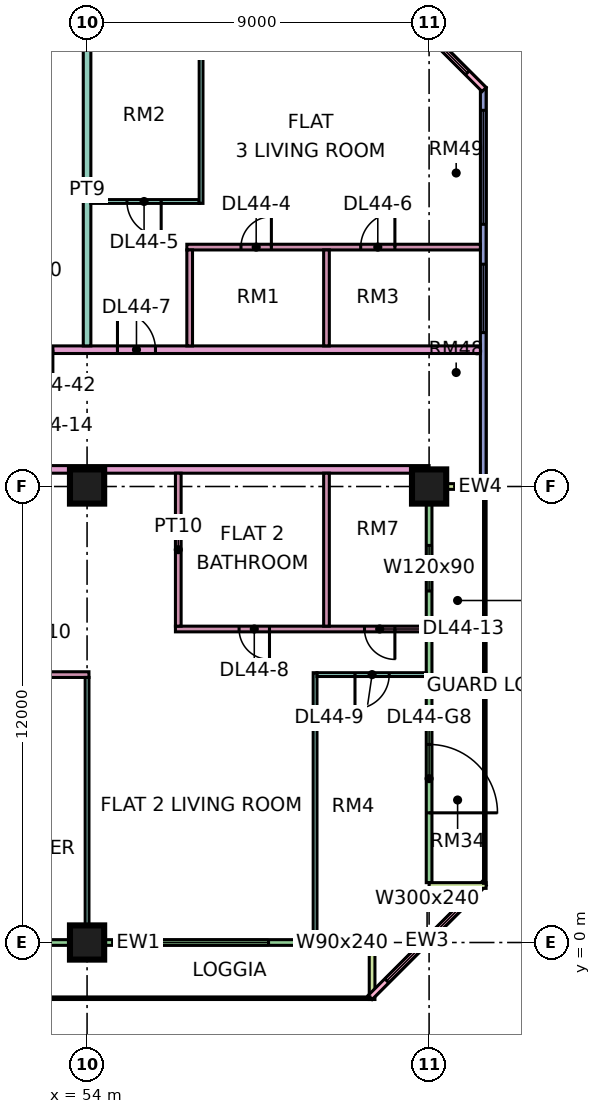
"""IFC4 building model, lengths in metres.
Left out: names, types, materials, properties, quantities, classifications, styles, units other than length and angle.
Written with IfcOpenShell. Run it as: python <this file> out.ifc"""

import sys

from ifc_helpers import new_model, si_unit, direction, frame, frame_2d, origin, origin_2d, place, context, subcontext, project, spatial, rectangle, extrude, element, fill, save


model = new_model("IFC4")
c1 = context("Model", 3, precision=1e-05, world=origin(), true_north=direction((0.0, 1.0)))
c2 = subcontext(c1, "Body", "Model", "MODEL_VIEW")
j1 = project(units=[si_unit("LENGTHUNIT", "METRE"), si_unit("PLANEANGLEUNIT", "RADIAN")], contexts=[c1])
p1 = place(None, origin())
s1 = spatial("IfcSite", under=j1, at=p1, CompositionType="ELEMENT")
p2 = place(p1, origin())
s2 = spatial("IfcBuilding", under=s1, at=p2, CompositionType="ELEMENT")
p3 = place(p2, frame((0.0, 0.0, 191.15)))
s3 = spatial("IfcBuildingStorey", under=s2, at=p3, CompositionType="ELEMENT", Elevation=191.15)
for number, where, z_axis, x_axis in (
    (1, (54.0, 0.0, 0.0), (0.0, 0.0, 1.0), (1.0, 0.0, 0.0)),
    (2, (54.0, 12.0, 0.0), (0.0, 0.0, 1.0), (1.0, 0.0, 0.0)),
    (3, (63.0, 12.0, 0.0), (0.0, 0.0, 1.0), (1.0, 0.0, 0.0)),
):
    element("IfcColumn", number, at=place(p3, frame(where, z_axis=z_axis, x_axis=x_axis)), inside=s3, PredefinedType="COLUMN", context=c2, shape_type="SweptSolid", body=[
        extrude(rectangle(XDim=0.9, YDim=0.9, at=origin_2d()), origin(), (0.0, 0.0, 1.0), 3.75),
    ])
p4 = place(p3, frame((48.075, 0.0, 0.0), z_axis=(0.0, 0.0, 1.0), x_axis=(1.0, 0.0, 0.0)))
e4 = element("IfcWall", 4, at=p4, inside=s3, PredefinedType="SOLIDWALL", context=c2, shape_type="SweptSolid", body=[
    extrude(rectangle(XDim=13.35, YDim=0.15, at=frame_2d((6.675, 0.0))), origin(), (0.0, 0.0, 1.0), 3.35),
])
p5 = place(p4, frame((1.788, 0.0, 0.0)))
e5 = element("IfcOpeningElement", 5, at=p5, cuts=e4, PredefinedType="OPENING", context=c2, shape_type="SweptSolid", body=[
    extrude(rectangle(XDim=1.8, YDim=2.4, at=frame_2d((0.9, 1.2))), frame((0.0, 0.085, 0.0), z_axis=(0.0, -1.0, 0.0), x_axis=(1.0, 0.0, 0.0)), (0.0, 0.0, 1.0), 0.17),
])
p6 = place(p4, frame((7.7, 0.0, 0.45)))
e6 = element("IfcOpeningElement", 6, at=p6, cuts=e4, PredefinedType="OPENING", context=c2, shape_type="SweptSolid", body=[
    extrude(rectangle(XDim=3.0, YDim=2.4, at=frame_2d((1.5, 1.2))), frame((0.0, 0.085, 0.0), z_axis=(0.0, -1.0, 0.0), x_axis=(1.0, 0.0, 0.0)), (0.0, 0.0, 1.0), 0.17),
])
p7 = place(p4, frame((12.188, 0.0, 0.45)))
e7 = element("IfcOpeningElement", 7, at=p7, cuts=e4, PredefinedType="OPENING", context=c2, shape_type="SweptSolid", body=[
    extrude(rectangle(XDim=0.9, YDim=2.4, at=frame_2d((0.45, 1.2))), frame((0.0, 0.085, 0.0), z_axis=(0.0, -1.0, 0.0), x_axis=(1.0, 0.0, 0.0)), (0.0, 0.0, 1.0), 0.17),
])
p8 = place(p3, frame((61.5, -1.5, 0.0), z_axis=(0.0, 0.0, 1.0), x_axis=(0.0, 1.0, 0.0)))
e8 = element("IfcWall", 8, at=p8, inside=s3, PredefinedType="SOLIDWALL", context=c2, shape_type="SweptSolid", body=[
    extrude(rectangle(XDim=1.5, YDim=0.15, at=frame_2d((0.75, 0.0))), origin(), (0.0, 0.0, 1.0), 3.35),
])
p9 = place(p3, frame((61.447, -1.447, 0.0), z_axis=(0.0, 0.0, 1.0), x_axis=(0.707106781187, 0.707106781187, 0.0)))
e9 = element("IfcWall", 9, at=p9, inside=s3, PredefinedType="SOLIDWALL", context=c2, shape_type="SweptSolid", body=[
    extrude(rectangle(XDim=4.243, YDim=0.15, at=frame_2d((2.121, 0.0))), origin(), (0.0, 0.0, 1.0), 3.35),
])
p10 = place(p9, frame((0.621, 0.0, 0.45)))
e10 = element("IfcOpeningElement", 10, at=p10, cuts=e9, PredefinedType="OPENING", context=c2, shape_type="SweptSolid", body=[
    extrude(rectangle(XDim=3.0, YDim=2.4, at=frame_2d((1.5, 1.2))), frame((0.0, 0.085, 0.0), z_axis=(0.0, -1.0, 0.0), x_axis=(1.0, 0.0, 0.0)), (0.0, 0.0, 1.0), 0.17),
])
p11 = place(p3, frame((63.0, 1.575, 0.0), z_axis=(0.0, 0.0, 1.0), x_axis=(0.0, 1.0, 0.0)))
e11 = element("IfcWall", 11, at=p11, inside=s3, PredefinedType="SOLIDWALL", context=c2, shape_type="SweptSolid", body=[
    extrude(rectangle(XDim=10.35, YDim=0.15, at=frame_2d((5.175, 0.0))), origin(), (0.0, 0.0, 1.0), 3.35),
])
p12 = place(p11, frame((1.837, 0.0, 0.0)))
e12 = element("IfcOpeningElement", 12, at=p12, cuts=e11, PredefinedType="OPENING", context=c2, shape_type="SweptSolid", body=[
    extrude(rectangle(XDim=1.8, YDim=2.4, at=frame_2d((0.9, 1.2))), frame((0.0, 0.085, 0.0), z_axis=(0.0, -1.0, 0.0), x_axis=(1.0, 0.0, 0.0)), (0.0, 0.0, 1.0), 0.17),
])
p13 = place(p11, frame((7.675, 0.0, 1.7)))
e13 = element("IfcOpeningElement", 13, at=p13, cuts=e11, PredefinedType="OPENING", context=c2, shape_type="SweptSolid", body=[
    extrude(rectangle(XDim=1.2, YDim=0.9, at=frame_2d((0.6, 0.45))), frame((0.0, 0.085, 0.0), z_axis=(0.0, -1.0, 0.0), x_axis=(1.0, 0.0, 0.0)), (0.0, 0.0, 1.0), 0.17),
])
for number, where, z_axis, x_axis in (
    (14, (64.5, 1.5, 0.0), (0.0, 0.0, 1.0), (-1.0, 0.0, 0.0)),
    (15, (64.5, 12.0, 0.0), (0.0, 0.0, 1.0), (-1.0, 0.0, 0.0)),
):
    element("IfcWall", number, at=place(p3, frame(where, z_axis=z_axis, x_axis=x_axis)), inside=s3, PredefinedType="SOLIDWALL", context=c2, shape_type="SweptSolid", body=[
        extrude(rectangle(XDim=1.5, YDim=0.15, at=frame_2d((0.75, 0.0))), origin(), (0.0, 0.0, 1.0), 3.35),
    ])
p14 = place(p3, frame((64.425, 12.075, 0.0), z_axis=(0.0, 0.0, 1.0), x_axis=(0.0, 1.0, 0.0)))
e16 = element("IfcWall", 16, at=p14, inside=s3, PredefinedType="SOLIDWALL", context=c2, shape_type="SweptSolid", body=[
    extrude(rectangle(XDim=10.425, YDim=0.15, at=frame_2d((5.212, 0.0))), origin(), (0.0, 0.0, 1.0), 3.35),
])
p15 = place(p14, frame((3.975, 0.0, 0.45)))
e17 = element("IfcOpeningElement", 17, at=p15, cuts=e16, PredefinedType="OPENING", context=c2, shape_type="SweptSolid", body=[
    extrude(rectangle(XDim=1.8, YDim=2.4, at=frame_2d((0.9, 1.2))), frame((0.0, 0.085, 0.0), z_axis=(0.0, -1.0, 0.0), x_axis=(1.0, 0.0, 0.0)), (0.0, 0.0, 1.0), 0.17),
])
p16 = place(p14, frame((6.825, 0.0, 0.45)))
e18 = element("IfcOpeningElement", 18, at=p16, cuts=e16, PredefinedType="OPENING", context=c2, shape_type="SweptSolid", body=[
    extrude(rectangle(XDim=3.0, YDim=2.4, at=frame_2d((1.5, 1.2))), frame((0.0, 0.085, 0.0), z_axis=(0.0, -1.0, 0.0), x_axis=(1.0, 0.0, 0.0)), (0.0, 0.0, 1.0), 0.17),
])
p17 = place(p3, frame((64.447, 22.447, 0.0), z_axis=(0.0, 0.0, 1.0), x_axis=(-0.707106781187, 0.707106781187, 0.0)))
e19 = element("IfcWall", 19, at=p17, inside=s3, PredefinedType="SOLIDWALL", context=c2, shape_type="SweptSolid", body=[
    extrude(rectangle(XDim=4.243, YDim=0.15, at=frame_2d((2.121, 0.0))), origin(), (0.0, 0.0, 1.0), 3.35),
])
p18 = place(p17, frame((0.621, 0.0, 0.45)))
e20 = element("IfcOpeningElement", 20, at=p18, cuts=e19, PredefinedType="OPENING", context=c2, shape_type="SweptSolid", body=[
    extrude(rectangle(XDim=3.0, YDim=2.4, at=frame_2d((1.5, 1.2))), frame((0.0, 0.085, 0.0), z_axis=(0.0, -1.0, 0.0), x_axis=(1.0, 0.0, 0.0)), (0.0, 0.0, 1.0), 0.17),
])
p19 = place(p3, frame((40.65, 12.45, 0.0), z_axis=(0.0, 0.0, 1.0), x_axis=(1.0, 0.0, 0.0)))
e21 = element("IfcWall", 21, at=p19, inside=s3, PredefinedType="PARTITIONING", context=c2, shape_type="SweptSolid", body=[
    extrude(rectangle(XDim=22.35, YDim=0.2, at=frame_2d((11.175, 0.0))), origin(), (0.0, 0.0, 1.0), 3.35),
])
p20 = place(p19, frame((10.8, 0.0, 0.0)))
e22 = element("IfcOpeningElement", 22, at=p20, cuts=e21, PredefinedType="OPENING", context=c2, shape_type="SweptSolid", body=[
    extrude(rectangle(XDim=1.0, YDim=2.1, at=frame_2d((0.5, 1.05))), frame((0.0, 0.11, 0.0), z_axis=(0.0, -1.0, 0.0), x_axis=(1.0, 0.0, 0.0)), (0.0, 0.0, 1.0), 0.22),
])
p21 = place(p19, frame((1.05, 0.0, 0.0)))
e23 = element("IfcOpeningElement", 23, at=p21, cuts=e21, PredefinedType="OPENING", context=c2, shape_type="SweptSolid", body=[
    extrude(rectangle(XDim=1.0, YDim=2.1, at=frame_2d((0.5, 1.05))), frame((0.0, 0.11, 0.0), z_axis=(0.0, -1.0, 0.0), x_axis=(1.0, 0.0, 0.0)), (0.0, 0.0, 1.0), 0.22),
])
p22 = place(p3, frame((48.1, 7.05, 0.0), z_axis=(0.0, 0.0, 1.0), x_axis=(1.0, 0.0, 0.0)))
e24 = element("IfcWall", 24, at=p22, inside=s3, PredefinedType="PARTITIONING", context=c2, shape_type="SweptSolid", body=[
    extrude(rectangle(XDim=5.95, YDim=0.15, at=frame_2d((2.975, 0.0))), origin(), (0.0, 0.0, 1.0), 3.35),
])
p23 = place(p22, frame((3.95, 0.0, 0.0)))
e25 = element("IfcOpeningElement", 25, at=p23, cuts=e24, PredefinedType="OPENING", context=c2, shape_type="SweptSolid", body=[
    extrude(rectangle(XDim=0.9, YDim=2.1, at=frame_2d((0.45, 1.05))), frame((0.0, 0.085, 0.0), z_axis=(0.0, -1.0, 0.0), x_axis=(1.0, 0.0, 0.0)), (0.0, 0.0, 1.0), 0.17),
])
p24 = place(p3, frame((51.225, 15.6, 0.0), z_axis=(0.0, 0.0, 1.0), x_axis=(1.0, 0.0, 0.0)))
e26 = element("IfcWall", 26, at=p24, inside=s3, PredefinedType="PARTITIONING", context=c2, shape_type="SweptSolid", body=[
    extrude(rectangle(XDim=13.125, YDim=0.2, at=frame_2d((6.562, 0.0))), origin(), (0.0, 0.0, 1.0), 3.35),
])
p25 = place(p24, frame((3.575, 0.0, 0.0)))
e27 = element("IfcOpeningElement", 27, at=p25, cuts=e26, PredefinedType="OPENING", context=c2, shape_type="SweptSolid", body=[
    extrude(rectangle(XDim=1.0, YDim=2.1, at=frame_2d((0.5, 1.05))), frame((0.0, 0.11, 0.0), z_axis=(0.0, -1.0, 0.0), x_axis=(1.0, 0.0, 0.0)), (0.0, 0.0, 1.0), 0.22),
])
p26 = place(p24, frame((0.875, 0.0, 0.0)))
e28 = element("IfcOpeningElement", 28, at=p26, cuts=e26, PredefinedType="OPENING", context=c2, shape_type="SweptSolid", body=[
    extrude(rectangle(XDim=1.0, YDim=2.1, at=frame_2d((0.5, 1.05))), frame((0.0, 0.11, 0.0), z_axis=(0.0, -1.0, 0.0), x_axis=(1.0, 0.0, 0.0)), (0.0, 0.0, 1.0), 0.22),
])
p27 = place(p3, frame((54.0, 0.074, 0.0), z_axis=(0.0, 0.0, 1.0), x_axis=(0.0, 1.0, 0.0)))
e29 = element("IfcWall", 29, at=p27, inside=s3, PredefinedType="PARTITIONING", context=c2, shape_type="SweptSolid", body=[
    extrude(rectangle(XDim=6.901, YDim=0.1, at=frame_2d((3.451, 0.0))), origin(), (0.0, 0.0, 1.0), 3.35),
])
p28 = place(p3, frame((54.0, 15.7, 0.0), z_axis=(0.0, 0.0, 1.0), x_axis=(0.0, 1.0, 0.0)))
e30 = element("IfcWall", 30, at=p28, inside=s3, PredefinedType="PARTITIONING", context=c2, shape_type="SweptSolid", body=[
    extrude(rectangle(XDim=8.226, YDim=0.2, at=frame_2d((4.113, 0.0))), origin(), (0.0, 0.0, 1.0), 3.35),
])
p29 = place(p3, frame((54.1, 19.5, 0.0), z_axis=(0.0, 0.0, 1.0), x_axis=(1.0, 0.0, 0.0)))
e31 = element("IfcWall", 31, at=p29, inside=s3, PredefinedType="PARTITIONING", context=c2, shape_type="SweptSolid", body=[
    extrude(rectangle(XDim=2.85, YDim=0.1, at=frame_2d((1.425, 0.0))), origin(), (0.0, 0.0, 1.0), 3.35),
])
p30 = place(p29, frame((0.95, 0.0, 0.0)))
e32 = element("IfcOpeningElement", 32, at=p30, cuts=e31, PredefinedType="OPENING", context=c2, shape_type="SweptSolid", body=[
    extrude(rectangle(XDim=0.9, YDim=2.1, at=frame_2d((0.45, 1.05))), frame((0.0, 0.06, 0.0), z_axis=(0.0, -1.0, 0.0), x_axis=(1.0, 0.0, 0.0)), (0.0, 0.0, 1.0), 0.12),
])
p31 = place(p3, frame((56.325, 8.25, 0.0), z_axis=(0.0, 0.0, 1.0), x_axis=(1.0, 0.0, 0.0)))
e33 = element("IfcWall", 33, at=p31, inside=s3, PredefinedType="PARTITIONING", context=c2, shape_type="SweptSolid", body=[
    extrude(rectangle(XDim=6.601, YDim=0.15, at=frame_2d((3.301, 0.0))), origin(), (0.0, 0.0, 1.0), 3.35),
])
p32 = place(p31, frame((1.675, 0.0, 0.0)))
e34 = element("IfcOpeningElement", 34, at=p32, cuts=e33, PredefinedType="OPENING", context=c2, shape_type="SweptSolid", body=[
    extrude(rectangle(XDim=0.8, YDim=2.1, at=frame_2d((0.4, 1.05))), frame((0.0, 0.085, 0.0), z_axis=(0.0, -1.0, 0.0), x_axis=(1.0, 0.0, 0.0)), (0.0, 0.0, 1.0), 0.17),
])
p33 = place(p31, frame((4.975, 0.0, 0.0)))
e35 = element("IfcOpeningElement", 35, at=p33, cuts=e33, PredefinedType="OPENING", context=c2, shape_type="SweptSolid", body=[
    extrude(rectangle(XDim=0.8, YDim=2.1, at=frame_2d((0.4, 1.05))), frame((0.0, 0.085, 0.0), z_axis=(0.0, -1.0, 0.0), x_axis=(1.0, 0.0, 0.0)), (0.0, 0.0, 1.0), 0.17),
])
p34 = place(p3, frame((56.4, 8.325, 0.0), z_axis=(0.0, 0.0, 1.0), x_axis=(0.0, 1.0, 0.0)))
e36 = element("IfcWall", 36, at=p34, inside=s3, PredefinedType="PARTITIONING", context=c2, shape_type="SweptSolid", body=[
    extrude(rectangle(XDim=4.025, YDim=0.15, at=frame_2d((2.013, 0.0))), origin(), (0.0, 0.0, 1.0), 3.35),
])
p35 = place(p3, frame((56.625, 18.3, 0.0), z_axis=(0.0, 0.0, 1.0), x_axis=(1.0, 0.0, 0.0)))
e37 = element("IfcWall", 37, at=p35, inside=s3, PredefinedType="PARTITIONING", context=c2, shape_type="SweptSolid", body=[
    extrude(rectangle(XDim=7.725, YDim=0.15, at=frame_2d((3.863, 0.0))), origin(), (0.0, 0.0, 1.0), 3.35),
])
p36 = place(p35, frame((1.425, 0.0, 0.0)))
e38 = element("IfcOpeningElement", 38, at=p36, cuts=e37, PredefinedType="OPENING", context=c2, shape_type="SweptSolid", body=[
    extrude(rectangle(XDim=0.8, YDim=2.1, at=frame_2d((0.4, 1.05))), frame((0.0, 0.085, 0.0), z_axis=(0.0, -1.0, 0.0), x_axis=(1.0, 0.0, 0.0)), (0.0, 0.0, 1.0), 0.17),
])
p37 = place(p35, frame((4.575, 0.0, 0.0)))
e39 = element("IfcOpeningElement", 39, at=p37, cuts=e37, PredefinedType="OPENING", context=c2, shape_type="SweptSolid", body=[
    extrude(rectangle(XDim=0.9, YDim=2.1, at=frame_2d((0.45, 1.05))), frame((0.0, 0.085, 0.0), z_axis=(0.0, -1.0, 0.0), x_axis=(1.0, 0.0, 0.0)), (0.0, 0.0, 1.0), 0.17),
])
p38 = place(p3, frame((56.7, 15.7, 0.0), z_axis=(0.0, 0.0, 1.0), x_axis=(0.0, 1.0, 0.0)))
e40 = element("IfcWall", 40, at=p38, inside=s3, PredefinedType="PARTITIONING", context=c2, shape_type="SweptSolid", body=[
    extrude(rectangle(XDim=2.525, YDim=0.15, at=frame_2d((1.263, 0.0))), origin(), (0.0, 0.0, 1.0), 3.35),
])
p39 = place(p3, frame((57.0, 19.45, 0.0), z_axis=(0.0, 0.0, 1.0), x_axis=(0.0, 1.0, 0.0)))
e41 = element("IfcWall", 41, at=p39, inside=s3, PredefinedType="PARTITIONING", context=c2, shape_type="SweptSolid", body=[
    extrude(rectangle(XDim=4.476, YDim=0.1, at=frame_2d((2.238, 0.0))), origin(), (0.0, 0.0, 1.0), 3.35),
])
p40 = place(p3, frame((60.0, 0.074, 0.0), z_axis=(0.0, 0.0, 1.0), x_axis=(0.0, 1.0, 0.0)))
e42 = element("IfcWall", 42, at=p40, inside=s3, PredefinedType="PARTITIONING", context=c2, shape_type="SweptSolid", body=[
    extrude(rectangle(XDim=7.026, YDim=0.1, at=frame_2d((3.513, 0.0))), origin(), (0.0, 0.0, 1.0), 3.35),
])
p41 = place(p3, frame((60.05, 7.05, 0.0), z_axis=(0.0, 0.0, 1.0), x_axis=(1.0, 0.0, 0.0)))
e43 = element("IfcWall", 43, at=p41, inside=s3, PredefinedType="PARTITIONING", context=c2, shape_type="SweptSolid", body=[
    extrude(rectangle(XDim=2.876, YDim=0.1, at=frame_2d((1.438, 0.0))), origin(), (0.0, 0.0, 1.0), 3.35),
])
p42 = place(p41, frame((1.0, 0.0, 0.0)))
e44 = element("IfcOpeningElement", 44, at=p42, cuts=e43, PredefinedType="OPENING", context=c2, shape_type="SweptSolid", body=[
    extrude(rectangle(XDim=0.9, YDim=2.1, at=frame_2d((0.45, 1.05))), frame((0.0, 0.06, 0.0), z_axis=(0.0, -1.0, 0.0), x_axis=(1.0, 0.0, 0.0)), (0.0, 0.0, 1.0), 0.12),
])
p43 = place(p3, frame((60.3, 8.325, 0.0), z_axis=(0.0, 0.0, 1.0), x_axis=(0.0, 1.0, 0.0)))
e45 = element("IfcWall", 45, at=p43, inside=s3, PredefinedType="PARTITIONING", context=c2, shape_type="SweptSolid", body=[
    extrude(rectangle(XDim=4.025, YDim=0.15, at=frame_2d((2.013, 0.0))), origin(), (0.0, 0.0, 1.0), 3.35),
])
p44 = place(p3, frame((60.3, 15.7, 0.0), z_axis=(0.0, 0.0, 1.0), x_axis=(0.0, 1.0, 0.0)))
e46 = element("IfcWall", 46, at=p44, inside=s3, PredefinedType="PARTITIONING", context=c2, shape_type="SweptSolid", body=[
    extrude(rectangle(XDim=2.525, YDim=0.15, at=frame_2d((1.263, 0.0))), origin(), (0.0, 0.0, 1.0), 3.35),
])
p45 = place(p6, origin())
e47 = element("IfcWindow", 47, at=p45, inside=s3, PartitioningType="SINGLE_PANEL", PredefinedType="WINDOW", context=c2, shape_type="SweptSolid", body=[
    extrude(rectangle(XDim=3.0, YDim=2.4, at=frame_2d((1.5, 1.2))), frame((0.0, 0.03, 0.0), z_axis=(0.0, -1.0, 0.0), x_axis=(1.0, 0.0, 0.0)), (0.0, 0.0, 1.0), 0.06),
])
fill(e6, e47)
p46 = place(p7, origin())
e48 = element("IfcWindow", 48, at=p46, inside=s3, PartitioningType="SINGLE_PANEL", PredefinedType="WINDOW", context=c2, shape_type="SweptSolid", body=[
    extrude(rectangle(XDim=0.9, YDim=2.4, at=frame_2d((0.45, 1.2))), frame((0.0, 0.03, 0.0), z_axis=(0.0, -1.0, 0.0), x_axis=(1.0, 0.0, 0.0)), (0.0, 0.0, 1.0), 0.06),
])
fill(e7, e48)
p47 = place(p10, origin())
e49 = element("IfcWindow", 49, at=p47, inside=s3, PartitioningType="SINGLE_PANEL", PredefinedType="WINDOW", context=c2, shape_type="SweptSolid", body=[
    extrude(rectangle(XDim=3.0, YDim=2.4, at=frame_2d((1.5, 1.2))), frame((0.0, 0.03, 0.0), z_axis=(0.0, -1.0, 0.0), x_axis=(1.0, 0.0, 0.0)), (0.0, 0.0, 1.0), 0.06),
])
fill(e10, e49)
p48 = place(p12, frame((1.8, 0.0, 0.0), z_axis=(0.0, 0.0, 1.0), x_axis=(-1.0, 0.0, 0.0)))
e50 = element("IfcDoor", 50, at=p48, inside=s3, OperationType="DOUBLE_DOOR_SINGLE_SWING", PredefinedType="DOOR", context=c2, shape_type="SweptSolid", body=[
    extrude(rectangle(XDim=1.8, YDim=2.4, at=frame_2d((0.9, 1.2))), frame((0.0, 0.025, 0.0), z_axis=(0.0, -1.0, 0.0), x_axis=(1.0, 0.0, 0.0)), (0.0, 0.0, 1.0), 0.05),
])
fill(e12, e50)
p49 = place(p13, origin())
e51 = element("IfcWindow", 51, at=p49, inside=s3, PartitioningType="SINGLE_PANEL", PredefinedType="WINDOW", context=c2, shape_type="SweptSolid", body=[
    extrude(rectangle(XDim=1.2, YDim=0.9, at=frame_2d((0.6, 0.45))), frame((0.0, 0.03, 0.0), z_axis=(0.0, -1.0, 0.0), x_axis=(1.0, 0.0, 0.0)), (0.0, 0.0, 1.0), 0.06),
])
fill(e13, e51)
p50 = place(p15, origin())
e52 = element("IfcWindow", 52, at=p50, inside=s3, PartitioningType="SINGLE_PANEL", PredefinedType="WINDOW", context=c2, shape_type="SweptSolid", body=[
    extrude(rectangle(XDim=1.8, YDim=2.4, at=frame_2d((0.9, 1.2))), frame((0.0, 0.03, 0.0), z_axis=(0.0, -1.0, 0.0), x_axis=(1.0, 0.0, 0.0)), (0.0, 0.0, 1.0), 0.06),
])
fill(e17, e52)
p51 = place(p16, origin())
e53 = element("IfcWindow", 53, at=p51, inside=s3, PartitioningType="SINGLE_PANEL", PredefinedType="WINDOW", context=c2, shape_type="SweptSolid", body=[
    extrude(rectangle(XDim=3.0, YDim=2.4, at=frame_2d((1.5, 1.2))), frame((0.0, 0.03, 0.0), z_axis=(0.0, -1.0, 0.0), x_axis=(1.0, 0.0, 0.0)), (0.0, 0.0, 1.0), 0.06),
])
fill(e18, e53)
p52 = place(p18, origin())
e54 = element("IfcWindow", 54, at=p52, inside=s3, PartitioningType="SINGLE_PANEL", PredefinedType="WINDOW", context=c2, shape_type="SweptSolid", body=[
    extrude(rectangle(XDim=3.0, YDim=2.4, at=frame_2d((1.5, 1.2))), frame((0.0, 0.03, 0.0), z_axis=(0.0, -1.0, 0.0), x_axis=(1.0, 0.0, 0.0)), (0.0, 0.0, 1.0), 0.06),
])
fill(e20, e54)
p53 = place(p36, frame((0.8, 0.0, 0.0), z_axis=(0.0, 0.0, 1.0), x_axis=(-1.0, 0.0, 0.0)))
e55 = element("IfcDoor", 55, at=p53, inside=s3, OperationType="SINGLE_SWING_RIGHT", PredefinedType="DOOR", context=c2, shape_type="SweptSolid", body=[
    extrude(rectangle(XDim=0.8, YDim=2.1, at=frame_2d((0.4, 1.05))), frame((0.0, 0.025, 0.0), z_axis=(0.0, -1.0, 0.0), x_axis=(1.0, 0.0, 0.0)), (0.0, 0.0, 1.0), 0.05),
])
fill(e38, e55)
p54 = place(p30, origin())
e56 = element("IfcDoor", 56, at=p54, inside=s3, OperationType="SINGLE_SWING_RIGHT", PredefinedType="DOOR", context=c2, shape_type="SweptSolid", body=[
    extrude(rectangle(XDim=0.9, YDim=2.1, at=frame_2d((0.45, 1.05))), frame((0.0, 0.025, 0.0), z_axis=(0.0, -1.0, 0.0), x_axis=(1.0, 0.0, 0.0)), (0.0, 0.0, 1.0), 0.05),
])
fill(e32, e56)
p55 = place(p37, frame((0.9, 0.0, 0.0), z_axis=(0.0, 0.0, 1.0), x_axis=(-1.0, 0.0, 0.0)))
e57 = element("IfcDoor", 57, at=p55, inside=s3, OperationType="SINGLE_SWING_RIGHT", PredefinedType="DOOR", context=c2, shape_type="SweptSolid", body=[
    extrude(rectangle(XDim=0.9, YDim=2.1, at=frame_2d((0.45, 1.05))), frame((0.0, 0.025, 0.0), z_axis=(0.0, -1.0, 0.0), x_axis=(1.0, 0.0, 0.0)), (0.0, 0.0, 1.0), 0.05),
])
fill(e39, e57)
p56 = place(p25, origin())
e58 = element("IfcDoor", 58, at=p56, inside=s3, OperationType="SINGLE_SWING_LEFT", PredefinedType="DOOR", context=c2, shape_type="SweptSolid", body=[
    extrude(rectangle(XDim=1.0, YDim=2.1, at=frame_2d((0.5, 1.05))), frame((0.0, 0.025, 0.0), z_axis=(0.0, -1.0, 0.0), x_axis=(1.0, 0.0, 0.0)), (0.0, 0.0, 1.0), 0.05),
])
fill(e27, e58)
p57 = place(p32, origin())
e59 = element("IfcDoor", 59, at=p57, inside=s3, OperationType="SINGLE_SWING_RIGHT", PredefinedType="DOOR", context=c2, shape_type="SweptSolid", body=[
    extrude(rectangle(XDim=0.8, YDim=2.1, at=frame_2d((0.4, 1.05))), frame((0.0, 0.025, 0.0), z_axis=(0.0, -1.0, 0.0), x_axis=(1.0, 0.0, 0.0)), (0.0, 0.0, 1.0), 0.05),
])
fill(e34, e59)
p58 = place(p42, frame((0.9, 0.0, 0.0), z_axis=(0.0, 0.0, 1.0), x_axis=(-1.0, 0.0, 0.0)))
e60 = element("IfcDoor", 60, at=p58, inside=s3, OperationType="SINGLE_SWING_LEFT", PredefinedType="DOOR", context=c2, shape_type="SweptSolid", body=[
    extrude(rectangle(XDim=0.9, YDim=2.1, at=frame_2d((0.45, 1.05))), frame((0.0, 0.025, 0.0), z_axis=(0.0, -1.0, 0.0), x_axis=(1.0, 0.0, 0.0)), (0.0, 0.0, 1.0), 0.05),
])
fill(e44, e60)
p59 = place(p33, origin())
e61 = element("IfcDoor", 61, at=p59, inside=s3, OperationType="SINGLE_SWING_RIGHT", PredefinedType="DOOR", context=c2, shape_type="SweptSolid", body=[
    extrude(rectangle(XDim=0.8, YDim=2.1, at=frame_2d((0.4, 1.05))), frame((0.0, 0.025, 0.0), z_axis=(0.0, -1.0, 0.0), x_axis=(1.0, 0.0, 0.0)), (0.0, 0.0, 1.0), 0.05),
])
fill(e35, e61)
p60 = place(p26, origin())
e62 = element("IfcDoor", 62, at=p60, inside=s3, OperationType="SINGLE_SWING_RIGHT", PredefinedType="DOOR", context=c2, shape_type="SweptSolid", body=[
    extrude(rectangle(XDim=1.0, YDim=2.1, at=frame_2d((0.5, 1.05))), frame((0.0, 0.025, 0.0), z_axis=(0.0, -1.0, 0.0), x_axis=(1.0, 0.0, 0.0)), (0.0, 0.0, 1.0), 0.05),
])
fill(e28, e62)
save(model, sys.argv[1])
